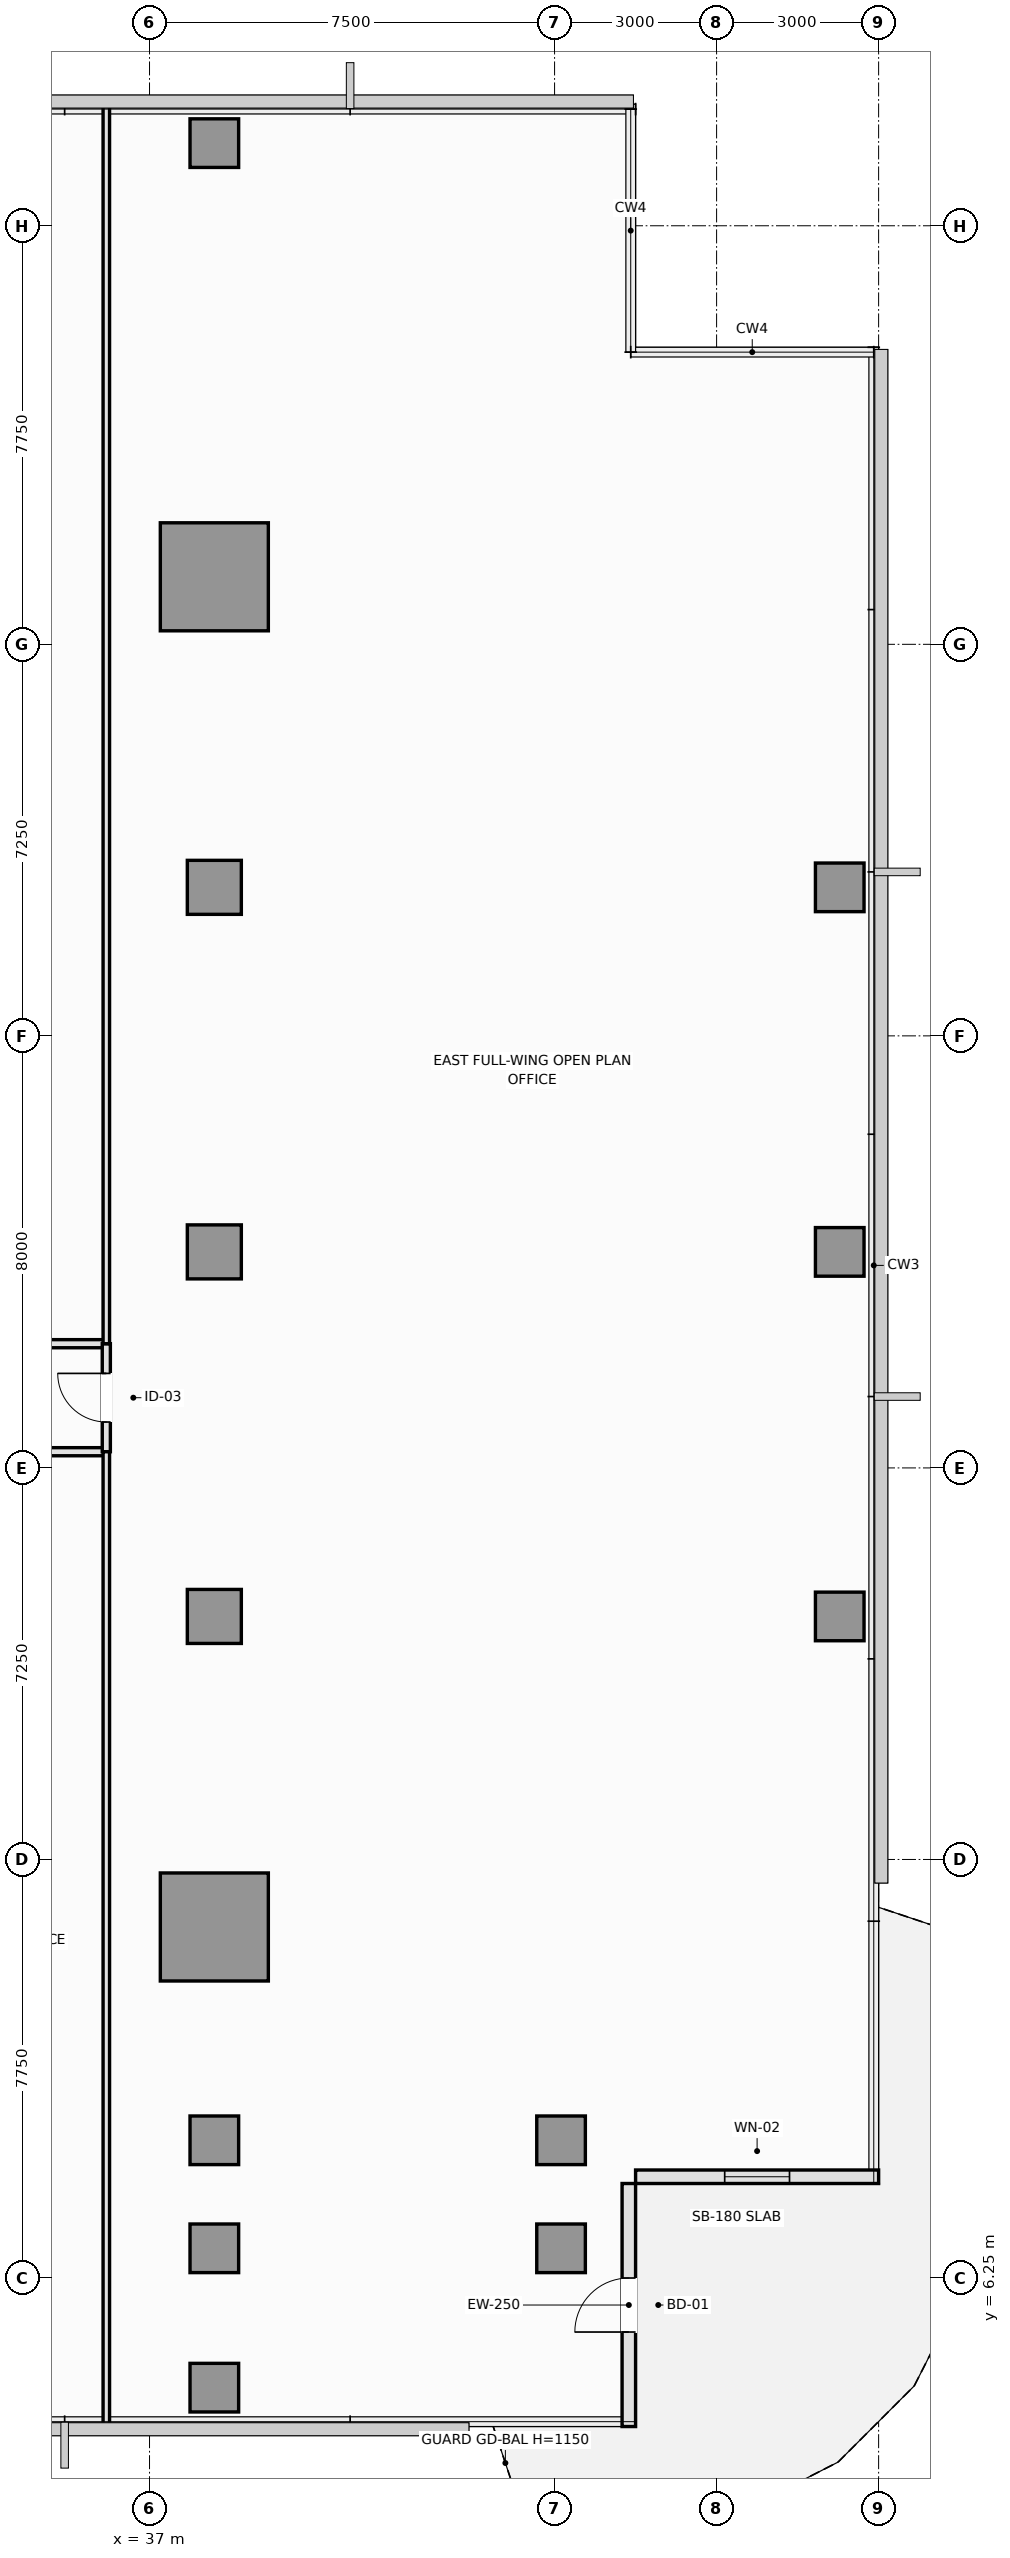
"""IFC4 building model, lengths in metres.
Left out: names, types, materials, properties, quantities, classifications, styles, units other than length and angle.
Written with IfcOpenShell. Run it as: python <this file> out.ifc"""

import sys

from ifc_helpers import new_model, si_unit, direction, frame, frame_2d, origin, origin_2d, place, context, subcontext, project, spatial, rectangle, extrude, element, fill, save


model = new_model("IFC4")
c1 = context("Model", 3, precision=1e-05, world=origin(), true_north=direction((0.0, 1.0)))
c2 = subcontext(c1, "Body", "Model", "MODEL_VIEW")
j1 = project(units=[si_unit("LENGTHUNIT", "METRE"), si_unit("PLANEANGLEUNIT", "RADIAN")], contexts=[c1])
p1 = place(None, origin())
s1 = spatial("IfcSite", under=j1, at=p1, CompositionType="ELEMENT")
p2 = place(p1, origin())
s2 = spatial("IfcBuilding", under=s1, at=p2, CompositionType="ELEMENT")
p3 = place(p2, frame((0.0, 0.0, 134.2)))
s3 = spatial("IfcBuildingStorey", under=s2, at=p3, CompositionType="ELEMENT", Elevation=134.2)
for number, where, z_axis, x_axis in (
    (1, (38.2, 12.75, 0.0), (0.0, 0.0, 1.0), (1.0, 0.0, 0.0)),
    (2, (38.2, 37.75, 0.0), (0.0, 0.0, 1.0), (1.0, 0.0, 0.0)),
):
    element("IfcColumn", number, at=place(p3, frame(where, z_axis=z_axis, x_axis=x_axis)), inside=s3, PredefinedType="COLUMN", context=c2, shape_type="SweptSolid", body=[
        extrude(rectangle(XDim=2.0, YDim=2.0, at=origin_2d()), origin(), (0.0, 0.0, 1.0), 3.55),
    ])
for number, where, z_axis, x_axis in (
    (3, (38.2, 18.5, 0.0), (0.0, 0.0, 1.0), (1.0, 0.0, 0.0)),
    (4, (38.2, 25.25, 0.0), (0.0, 0.0, 1.0), (1.0, 0.0, 0.0)),
    (5, (38.2, 32.0, 0.0), (0.0, 0.0, 1.0), (1.0, 0.0, 0.0)),
):
    element("IfcColumn", number, at=place(p3, frame(where, z_axis=z_axis, x_axis=x_axis)), inside=s3, PredefinedType="COLUMN", context=c2, shape_type="SweptSolid", body=[
        extrude(rectangle(XDim=1.0, YDim=1.0, at=origin_2d()), origin(), (0.0, 0.0, 1.0), 3.55),
    ])
for number, where, z_axis, x_axis in (
    (6, (38.2, 6.8, 0.0), (0.0, 0.0, 1.0), (1.0, 0.0, 0.0)),
    (7, (38.2, 8.8, 0.0), (0.0, 0.0, 1.0), (1.0, 0.0, 0.0)),
    (8, (44.62, 6.8, 0.0), (0.0, 0.0, 1.0), (1.0, 0.0, 0.0)),
    (9, (44.62, 8.8, 0.0), (0.0, 0.0, 1.0), (1.0, 0.0, 0.0)),
    (10, (49.78, 18.5, 0.0), (0.0, 0.0, 1.0), (1.0, 0.0, 0.0)),
    (11, (49.78, 25.25, 0.0), (0.0, 0.0, 1.0), (1.0, 0.0, 0.0)),
    (12, (49.78, 32.0, 0.0), (0.0, 0.0, 1.0), (1.0, 0.0, 0.0)),
    (13, (38.2, 4.22, 0.0), (0.0, 0.0, 1.0), (1.0, 0.0, 0.0)),
    (14, (38.2, 45.78, 0.0), (0.0, 0.0, 1.0), (1.0, 0.0, 0.0)),
):
    element("IfcColumn", number, at=place(p3, frame(where, z_axis=z_axis, x_axis=x_axis)), inside=s3, PredefinedType="COLUMN", context=c2, shape_type="SweptSolid", body=[
        extrude(rectangle(XDim=0.9, YDim=0.9, at=origin_2d()), origin(), (0.0, 0.0, 1.0), 3.55),
    ])
p4 = place(p3, frame((45.875, 3.5, 0.0), z_axis=(0.0, 0.0, 1.0), x_axis=(0.0, 1.0, 0.0)))
e15 = element("IfcWall", 15, at=p4, inside=s3, PredefinedType="SOLIDWALL", context=c2, shape_type="SweptSolid", body=[
    extrude(rectangle(XDim=4.5, YDim=0.25, at=frame_2d((2.25, 0.0))), origin(), (0.0, 0.0, 1.0), 3.07),
])
p5 = place(p4, frame((1.75, 0.0, 0.0)))
e16 = element("IfcOpeningElement", 16, at=p5, cuts=e15, PredefinedType="OPENING", context=c2, shape_type="SweptSolid", body=[
    extrude(rectangle(XDim=1.0, YDim=2.2, at=frame_2d((0.5, 1.1))), frame((0.0, 0.135, 0.0), z_axis=(0.0, -1.0, 0.0), x_axis=(1.0, 0.0, 0.0)), (0.0, 0.0, 1.0), 0.27),
])
p6 = place(p3, frame((46.0, 8.125, 0.0), z_axis=(0.0, 0.0, 1.0), x_axis=(1.0, 0.0, 0.0)))
e17 = element("IfcWall", 17, at=p6, inside=s3, PredefinedType="SOLIDWALL", context=c2, shape_type="SweptSolid", body=[
    extrude(rectangle(XDim=4.5, YDim=0.25, at=frame_2d((2.25, 0.0))), origin(), (0.0, 0.0, 1.0), 3.1),
])
p7 = place(p6, frame((1.65, 0.0, 0.9)))
e18 = element("IfcOpeningElement", 18, at=p7, cuts=e17, PredefinedType="OPENING", context=c2, shape_type="SweptSolid", body=[
    extrude(rectangle(XDim=1.2, YDim=1.8, at=frame_2d((0.6, 0.9))), frame((0.0, 0.135, 0.0), z_axis=(0.0, -1.0, 0.0), x_axis=(1.0, 0.0, 0.0)), (0.0, 0.0, 1.0), 0.27),
])
p8 = place(p3, frame((32.8, 21.55, 0.0), z_axis=(0.0, 0.0, 1.0), x_axis=(1.0, 0.0, 0.0)))
e19 = element("IfcWall", 19, at=p8, inside=s3, PredefinedType="PARTITIONING", context=c2, shape_type="SweptSolid", body=[
    extrude(rectangle(XDim=3.4, YDim=0.15, at=frame_2d((1.7, 0.0))), origin(), (0.0, 0.0, 1.0), 3.37),
])
p9 = place(p8, frame((1.2, 0.0, 0.0)))
e20 = element("IfcOpeningElement", 20, at=p9, cuts=e19, PredefinedType="OPENING", context=c2, shape_type="SweptSolid", body=[
    extrude(rectangle(XDim=1.0, YDim=2.15, at=frame_2d((0.5, 1.075))), frame((0.0, 0.085, 0.0), z_axis=(0.0, -1.0, 0.0), x_axis=(1.0, 0.0, 0.0)), (0.0, 0.0, 1.0), 0.17),
])
p10 = place(p3, frame((31.8, 23.55, 0.0), z_axis=(0.0, 0.0, 1.0), x_axis=(1.0, 0.0, 0.0)))
e21 = element("IfcWall", 21, at=p10, inside=s3, PredefinedType="PARTITIONING", context=c2, shape_type="SweptSolid", body=[
    extrude(rectangle(XDim=4.4, YDim=0.15, at=frame_2d((2.2, 0.0))), origin(), (0.0, 0.0, 1.0), 3.37),
])
p11 = place(p10, frame((1.7, 0.0, 0.0)))
e22 = element("IfcOpeningElement", 22, at=p11, cuts=e21, PredefinedType="OPENING", context=c2, shape_type="SweptSolid", body=[
    extrude(rectangle(XDim=1.0, YDim=2.15, at=frame_2d((0.5, 1.075))), frame((0.0, 0.085, 0.0), z_axis=(0.0, -1.0, 0.0), x_axis=(1.0, 0.0, 0.0)), (0.0, 0.0, 1.0), 0.17),
])
p12 = place(p3, frame((36.2, 21.55, 0.0), z_axis=(0.0, 0.0, 1.0), x_axis=(0.0, 1.0, 0.0)))
e23 = element("IfcWall", 23, at=p12, inside=s3, PredefinedType="PARTITIONING", context=c2, shape_type="SweptSolid", body=[
    extrude(rectangle(XDim=2.0, YDim=0.15, at=frame_2d((1.0, 0.0))), origin(), (0.0, 0.0, 1.0), 3.37),
])
p13 = place(p12, frame((0.55, 0.0, 0.0)))
e24 = element("IfcOpeningElement", 24, at=p13, cuts=e23, PredefinedType="OPENING", context=c2, shape_type="SweptSolid", body=[
    extrude(rectangle(XDim=0.9, YDim=2.1, at=frame_2d((0.45, 1.05))), frame((0.0, 0.085, 0.0), z_axis=(0.0, -1.0, 0.0), x_axis=(1.0, 0.0, 0.0)), (0.0, 0.0, 1.0), 0.17),
])
p14 = place(p3, frame((36.2, 3.51, 0.0), z_axis=(0.0, 0.0, 1.0), x_axis=(0.0, 1.0, 0.0)))
e25 = element("IfcWall", 25, at=p14, inside=s3, PredefinedType="PARTITIONING", context=c2, shape_type="SweptSolid", body=[
    extrude(rectangle(XDim=18.04, YDim=0.12, at=frame_2d((9.02, 0.0))), origin(), (0.0, 0.0, 1.0), 3.37),
])
p15 = place(p3, frame((36.2, 23.55, 0.0), z_axis=(0.0, 0.0, 1.0), x_axis=(0.0, 1.0, 0.0)))
e26 = element("IfcWall", 26, at=p15, inside=s3, PredefinedType="PARTITIONING", context=c2, shape_type="SweptSolid", body=[
    extrude(rectangle(XDim=22.94, YDim=0.12, at=frame_2d((11.47, 0.0))), origin(), (0.0, 0.0, 1.0), 3.37),
])
p16 = place(p5, frame((1.0, 0.0, 0.0), z_axis=(0.0, 0.0, 1.0), x_axis=(-1.0, 0.0, 0.0)))
e27 = element("IfcDoor", 27, at=p16, inside=s3, OperationType="SINGLE_SWING_LEFT", PredefinedType="DOOR", context=c2, shape_type="SweptSolid", body=[
    extrude(rectangle(XDim=1.0, YDim=2.2, at=frame_2d((0.5, 1.1))), frame((0.0, 0.025, 0.0), z_axis=(0.0, -1.0, 0.0), x_axis=(1.0, 0.0, 0.0)), (0.0, 0.0, 1.0), 0.05),
])
fill(e16, e27)
p17 = place(p7, origin())
e28 = element("IfcWindow", 28, at=p17, inside=s3, PartitioningType="SINGLE_PANEL", PredefinedType="WINDOW", context=c2, shape_type="SweptSolid", body=[
    extrude(rectangle(XDim=1.2, YDim=1.8, at=frame_2d((0.6, 0.9))), frame((0.0, 0.03, 0.0), z_axis=(0.0, -1.0, 0.0), x_axis=(1.0, 0.0, 0.0)), (0.0, 0.0, 1.0), 0.06),
])
fill(e18, e28)
p18 = place(p13, origin())
e29 = element("IfcDoor", 29, at=p18, inside=s3, OperationType="SINGLE_SWING_RIGHT", PredefinedType="DOOR", context=c2, shape_type="SweptSolid", body=[
    extrude(rectangle(XDim=0.9, YDim=2.1, at=frame_2d((0.45, 1.05))), frame((0.0, 0.025, 0.0), z_axis=(0.0, -1.0, 0.0), x_axis=(1.0, 0.0, 0.0)), (0.0, 0.0, 1.0), 0.05),
])
fill(e24, e29)
save(model, sys.argv[1])
